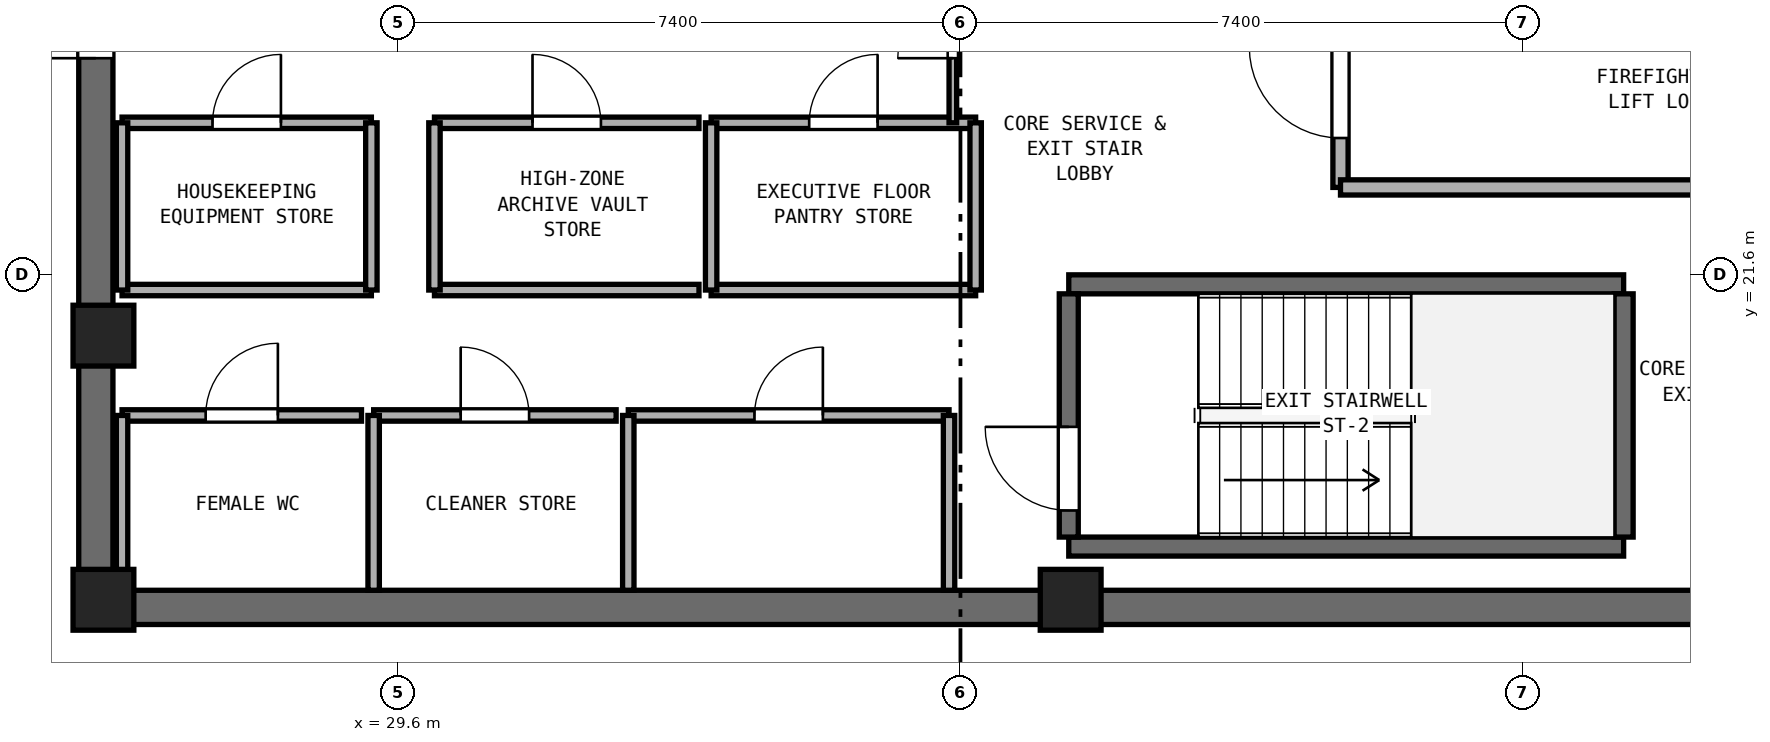
"""IFC4 building model, lengths in metres.
Left out: names, types, materials, properties, quantities, classifications, styles, units other than length and angle.
Written with IfcOpenShell. Run it as: python <this file> out.ifc"""

import sys

from ifc_helpers import new_model, si_unit, direction, frame, frame_2d, origin, origin_2d, place, context, subcontext, project, spatial, rectangle, extrude, element, fill, save


model = new_model("IFC4")
c1 = context("Model", 3, precision=1e-05, world=origin(), true_north=direction((0.0, 1.0)))
c2 = subcontext(c1, "Body", "Model", "MODEL_VIEW")
j1 = project(units=[si_unit("LENGTHUNIT", "METRE"), si_unit("PLANEANGLEUNIT", "RADIAN")], contexts=[c1])
p1 = place(None, origin())
s1 = spatial("IfcSite", under=j1, at=p1, CompositionType="ELEMENT")
p2 = place(p1, origin())
s2 = spatial("IfcBuilding", under=s1, at=p2, CompositionType="ELEMENT")
p3 = place(p2, frame((0.0, 0.0, 293.4)))
s3 = spatial("IfcBuildingStorey", under=s2, at=p3, CompositionType="ELEMENT", Elevation=293.4)
p4 = place(p3, frame((25.4, 17.225, 0.0), z_axis=(0.0, 0.0, 1.0), x_axis=(1.0, 0.0, 0.0)))
e1 = element("IfcWall", 1, at=p4, inside=s3, PredefinedType="SHEAR", context=c2, shape_type="SweptSolid", body=[
    extrude(rectangle(XDim=23.2, YDim=0.45, at=frame_2d((11.6, 0.0))), origin(), (0.0, 0.0, 1.0), 3.54),
])
p5 = place(p3, frame((25.625, 17.45, 0.0), z_axis=(0.0, 0.0, 1.0), x_axis=(0.0, 1.0, 0.0)))
e2 = element("IfcWall", 2, at=p5, inside=s3, PredefinedType="SHEAR", context=c2, shape_type="SweptSolid", body=[
    extrude(rectangle(XDim=15.5, YDim=0.45, at=frame_2d((7.75, 0.0))), origin(), (0.0, 0.0, 1.0), 3.54),
])
p6 = place(p5, frame((7.0, 0.0, 0.0)))
e3 = element("IfcOpeningElement", 3, at=p6, cuts=e2, PredefinedType="OPENING", context=c2, shape_type="SweptSolid", body=[
    extrude(rectangle(XDim=1.5, YDim=2.15, at=frame_2d((0.75, 1.075))), frame((0.0, 0.235, 0.0), z_axis=(0.0, -1.0, 0.0), x_axis=(1.0, 0.0, 0.0)), (0.0, 0.0, 1.0), 0.47),
])
for number, where, z_axis, x_axis in (
    (4, (25.725, 17.325, 0.0), (0.0, 0.0, 1.0), (1.0, 0.0, 0.0)),
    (5, (38.45, 17.325, 0.0), (0.0, 0.0, 1.0), (1.0, 0.0, 0.0)),
    (6, (25.725, 20.8, 0.0), (0.0, 0.0, 1.0), (1.0, 0.0, 0.0)),
):
    element("IfcColumn", number, at=place(p3, frame(where, z_axis=z_axis, x_axis=x_axis)), inside=s3, PredefinedType="PILASTER", context=c2, shape_type="SweptSolid", body=[
        extrude(rectangle(XDim=0.8, YDim=0.8, at=origin_2d()), origin(), (0.0, 0.0, 1.0), 3.8),
    ])
for number, where, z_axis, x_axis in (
    (7, (38.425, 18.025, 0.0), (0.0, 0.0, 1.0), (1.0, 0.0, 0.0)),
    (8, (38.425, 21.475, 0.0), (0.0, 0.0, 1.0), (1.0, 0.0, 0.0)),
):
    element("IfcWall", number, at=place(p3, frame(where, z_axis=z_axis, x_axis=x_axis)), inside=s3, PredefinedType="SHEAR", context=c2, shape_type="SweptSolid", body=[
        extrude(rectangle(XDim=7.3, YDim=0.25, at=frame_2d((3.65, 0.0))), origin(), (0.0, 0.0, 1.0), 3.54),
    ])
p7 = place(p3, frame((38.425, 18.15, 0.0), z_axis=(0.0, 0.0, 1.0), x_axis=(0.0, 1.0, 0.0)))
e9 = element("IfcWall", 9, at=p7, inside=s3, PredefinedType="SHEAR", context=c2, shape_type="SweptSolid", body=[
    extrude(rectangle(XDim=3.2, YDim=0.25, at=frame_2d((1.6, 0.0))), origin(), (0.0, 0.0, 1.0), 3.54),
])
p8 = place(p7, frame((0.35, 0.0, 0.0)))
e10 = element("IfcOpeningElement", 10, at=p8, cuts=e9, PredefinedType="OPENING", context=c2, shape_type="SweptSolid", body=[
    extrude(rectangle(XDim=1.1, YDim=2.15, at=frame_2d((0.55, 1.075))), frame((0.0, 0.135, 0.0), z_axis=(0.0, -1.0, 0.0), x_axis=(1.0, 0.0, 0.0)), (0.0, 0.0, 1.0), 0.27),
])
p9 = place(p3, frame((45.725, 18.15, 0.0), z_axis=(0.0, 0.0, 1.0), x_axis=(0.0, 1.0, 0.0)))
e11 = element("IfcWall", 11, at=p9, inside=s3, PredefinedType="SHEAR", context=c2, shape_type="SweptSolid", body=[
    extrude(rectangle(XDim=3.2, YDim=0.25, at=frame_2d((1.6, 0.0))), origin(), (0.0, 0.0, 1.0), 3.54),
])
p10 = place(p3, frame((42.0, 22.75, 0.0), z_axis=(0.0, 0.0, 1.0), x_axis=(0.0, 1.0, 0.0)))
e12 = element("IfcWall", 12, at=p10, inside=s3, PredefinedType="SOLIDWALL", context=c2, shape_type="SweptSolid", body=[
    extrude(rectangle(XDim=6.05, YDim=0.2, at=frame_2d((3.025, 0.0))), origin(), (0.0, 0.0, 1.0), 3.54),
])
p11 = place(p10, frame((0.65, 0.0, 0.0)))
e13 = element("IfcOpeningElement", 13, at=p11, cuts=e12, PredefinedType="OPENING", context=c2, shape_type="SweptSolid", body=[
    extrude(rectangle(XDim=1.2, YDim=2.15, at=frame_2d((0.6, 1.075))), frame((0.0, 0.11, 0.0), z_axis=(0.0, -1.0, 0.0), x_axis=(1.0, 0.0, 0.0)), (0.0, 0.0, 1.0), 0.22),
])
p12 = place(p3, frame((42.0, 22.75, 0.0), z_axis=(0.0, 0.0, 1.0), x_axis=(1.0, 0.0, 0.0)))
e14 = element("IfcWall", 14, at=p12, inside=s3, PredefinedType="SOLIDWALL", context=c2, shape_type="SweptSolid", body=[
    extrude(rectangle(XDim=6.15, YDim=0.2, at=frame_2d((3.075, 0.0))), origin(), (0.0, 0.0, 1.0), 3.54),
])
p13 = place(p3, frame((25.97, 19.75, 0.0), z_axis=(0.0, 0.0, 1.0), x_axis=(1.0, 0.0, 0.0)))
e15 = element("IfcWall", 15, at=p13, inside=s3, PredefinedType="PARTITIONING", context=c2, shape_type="SweptSolid", body=[
    extrude(rectangle(XDim=3.15, YDim=0.15, at=frame_2d((1.575, 0.0))), origin(), (0.0, 0.0, 1.0), 3.54),
])
p14 = place(p13, frame((1.1, 0.0, 0.0)))
e16 = element("IfcOpeningElement", 16, at=p14, cuts=e15, PredefinedType="OPENING", context=c2, shape_type="SweptSolid", body=[
    extrude(rectangle(XDim=0.95, YDim=2.1, at=frame_2d((0.475, 1.05))), frame((0.0, 0.085, 0.0), z_axis=(0.0, -1.0, 0.0), x_axis=(1.0, 0.0, 0.0)), (0.0, 0.0, 1.0), 0.17),
])
p15 = place(p3, frame((25.97, 17.45, 0.0), z_axis=(0.0, 0.0, 1.0), x_axis=(0.0, 1.0, 0.0)))
e17 = element("IfcWall", 17, at=p15, inside=s3, PredefinedType="PARTITIONING", context=c2, shape_type="SweptSolid", body=[
    extrude(rectangle(XDim=2.3, YDim=0.15, at=frame_2d((1.15, 0.0))), origin(), (0.0, 0.0, 1.0), 2.64),
])
p16 = place(p3, frame((29.28, 19.75, 0.0), z_axis=(0.0, 0.0, 1.0), x_axis=(1.0, 0.0, 0.0)))
e18 = element("IfcWall", 18, at=p16, inside=s3, PredefinedType="PARTITIONING", context=c2, shape_type="SweptSolid", body=[
    extrude(rectangle(XDim=3.19, YDim=0.15, at=frame_2d((1.595, 0.0))), origin(), (0.0, 0.0, 1.0), 3.54),
])
p17 = place(p16, frame((1.145, 0.0, 0.0)))
e19 = element("IfcOpeningElement", 19, at=p17, cuts=e18, PredefinedType="OPENING", context=c2, shape_type="SweptSolid", body=[
    extrude(rectangle(XDim=0.9, YDim=2.1, at=frame_2d((0.45, 1.05))), frame((0.0, 0.085, 0.0), z_axis=(0.0, -1.0, 0.0), x_axis=(1.0, 0.0, 0.0)), (0.0, 0.0, 1.0), 0.17),
])
p18 = place(p3, frame((29.28, 17.45, 0.0), z_axis=(0.0, 0.0, 1.0), x_axis=(0.0, 1.0, 0.0)))
e20 = element("IfcWall", 20, at=p18, inside=s3, PredefinedType="PARTITIONING", context=c2, shape_type="SweptSolid", body=[
    extrude(rectangle(XDim=2.3, YDim=0.15, at=frame_2d((1.15, 0.0))), origin(), (0.0, 0.0, 1.0), 3.54),
])
p19 = place(p3, frame((32.63, 19.75, 0.0), z_axis=(0.0, 0.0, 1.0), x_axis=(1.0, 0.0, 0.0)))
e21 = element("IfcWall", 21, at=p19, inside=s3, PredefinedType="PARTITIONING", context=c2, shape_type="SweptSolid", body=[
    extrude(rectangle(XDim=4.22, YDim=0.15, at=frame_2d((2.11, 0.0))), origin(), (0.0, 0.0, 1.0), 3.54),
])
p20 = place(p19, frame((1.66, 0.0, 0.0)))
e22 = element("IfcOpeningElement", 22, at=p20, cuts=e21, PredefinedType="OPENING", context=c2, shape_type="SweptSolid", body=[
    extrude(rectangle(XDim=0.9, YDim=2.1, at=frame_2d((0.45, 1.05))), frame((0.0, 0.085, 0.0), z_axis=(0.0, -1.0, 0.0), x_axis=(1.0, 0.0, 0.0)), (0.0, 0.0, 1.0), 0.17),
])
for number, where, z_axis, x_axis in (
    (23, (32.63, 17.45, 0.0), (0.0, 0.0, 1.0), (0.0, 1.0, 0.0)),
    (24, (36.85, 17.45, 0.0), (0.0, 0.0, 1.0), (0.0, 1.0, 0.0)),
):
    element("IfcWall", number, at=place(p3, frame(where, z_axis=z_axis, x_axis=x_axis)), inside=s3, PredefinedType="PARTITIONING", context=c2, shape_type="SweptSolid", body=[
        extrude(rectangle(XDim=2.3, YDim=0.15, at=frame_2d((1.15, 0.0))), origin(), (0.0, 0.0, 1.0), 3.54),
    ])
p21 = place(p3, frame((25.97, 21.4, 0.0), z_axis=(0.0, 0.0, 1.0), x_axis=(1.0, 0.0, 0.0)))
e25 = element("IfcWall", 25, at=p21, inside=s3, PredefinedType="PARTITIONING", context=c2, shape_type="SweptSolid", body=[
    extrude(rectangle(XDim=3.28, YDim=0.15, at=frame_2d((1.64, 0.0))), origin(), (0.0, 0.0, 1.0), 3.54),
])
p22 = place(p3, frame((25.97, 23.6, 0.0), z_axis=(0.0, 0.0, 1.0), x_axis=(1.0, 0.0, 0.0)))
e26 = element("IfcWall", 26, at=p22, inside=s3, PredefinedType="PARTITIONING", context=c2, shape_type="SweptSolid", body=[
    extrude(rectangle(XDim=3.28, YDim=0.15, at=frame_2d((1.64, 0.0))), origin(), (0.0, 0.0, 1.0), 3.54),
])
p23 = place(p22, frame((1.19, 0.0, 0.0)))
e27 = element("IfcOpeningElement", 27, at=p23, cuts=e26, PredefinedType="OPENING", context=c2, shape_type="SweptSolid", body=[
    extrude(rectangle(XDim=0.9, YDim=2.1, at=frame_2d((0.45, 1.05))), frame((0.0, 0.085, 0.0), z_axis=(0.0, -1.0, 0.0), x_axis=(1.0, 0.0, 0.0)), (0.0, 0.0, 1.0), 0.17),
])
p24 = place(p3, frame((25.97, 21.4, 0.0), z_axis=(0.0, 0.0, 1.0), x_axis=(0.0, 1.0, 0.0)))
e28 = element("IfcWall", 28, at=p24, inside=s3, PredefinedType="PARTITIONING", context=c2, shape_type="SweptSolid", body=[
    extrude(rectangle(XDim=2.2, YDim=0.15, at=frame_2d((1.1, 0.0))), origin(), (0.0, 0.0, 1.0), 2.64),
])
p25 = place(p3, frame((29.25, 21.4, 0.0), z_axis=(0.0, 0.0, 1.0), x_axis=(0.0, 1.0, 0.0)))
e29 = element("IfcWall", 29, at=p25, inside=s3, PredefinedType="PARTITIONING", context=c2, shape_type="SweptSolid", body=[
    extrude(rectangle(XDim=2.2, YDim=0.15, at=frame_2d((1.1, 0.0))), origin(), (0.0, 0.0, 1.0), 3.54),
])
p26 = place(p3, frame((30.08, 21.4, 0.0), z_axis=(0.0, 0.0, 1.0), x_axis=(1.0, 0.0, 0.0)))
e30 = element("IfcWall", 30, at=p26, inside=s3, PredefinedType="PARTITIONING", context=c2, shape_type="SweptSolid", body=[
    extrude(rectangle(XDim=3.48, YDim=0.15, at=frame_2d((1.74, 0.0))), origin(), (0.0, 0.0, 1.0), 3.54),
])
p27 = place(p3, frame((30.08, 23.6, 0.0), z_axis=(0.0, 0.0, 1.0), x_axis=(1.0, 0.0, 0.0)))
e31 = element("IfcWall", 31, at=p27, inside=s3, PredefinedType="PARTITIONING", context=c2, shape_type="SweptSolid", body=[
    extrude(rectangle(XDim=3.48, YDim=0.15, at=frame_2d((1.74, 0.0))), origin(), (0.0, 0.0, 1.0), 3.54),
])
p28 = place(p27, frame((1.29, 0.0, 0.0)))
e32 = element("IfcOpeningElement", 32, at=p28, cuts=e31, PredefinedType="OPENING", context=c2, shape_type="SweptSolid", body=[
    extrude(rectangle(XDim=0.9, YDim=2.1, at=frame_2d((0.45, 1.05))), frame((0.0, 0.085, 0.0), z_axis=(0.0, -1.0, 0.0), x_axis=(1.0, 0.0, 0.0)), (0.0, 0.0, 1.0), 0.17),
])
p29 = place(p3, frame((30.08, 21.4, 0.0), z_axis=(0.0, 0.0, 1.0), x_axis=(0.0, 1.0, 0.0)))
e33 = element("IfcWall", 33, at=p29, inside=s3, PredefinedType="PARTITIONING", context=c2, shape_type="SweptSolid", body=[
    extrude(rectangle(XDim=2.2, YDim=0.15, at=frame_2d((1.1, 0.0))), origin(), (0.0, 0.0, 1.0), 3.54),
])
p30 = place(p3, frame((33.72, 21.4, 0.0), z_axis=(0.0, 0.0, 1.0), x_axis=(1.0, 0.0, 0.0)))
e34 = element("IfcWall", 34, at=p30, inside=s3, PredefinedType="PARTITIONING", context=c2, shape_type="SweptSolid", body=[
    extrude(rectangle(XDim=3.48, YDim=0.15, at=frame_2d((1.74, 0.0))), origin(), (0.0, 0.0, 1.0), 3.54),
])
p31 = place(p3, frame((33.72, 23.6, 0.0), z_axis=(0.0, 0.0, 1.0), x_axis=(1.0, 0.0, 0.0)))
e35 = element("IfcWall", 35, at=p31, inside=s3, PredefinedType="PARTITIONING", context=c2, shape_type="SweptSolid", body=[
    extrude(rectangle(XDim=3.48, YDim=0.15, at=frame_2d((1.74, 0.0))), origin(), (0.0, 0.0, 1.0), 3.54),
])
p32 = place(p31, frame((1.29, 0.0, 0.0)))
e36 = element("IfcOpeningElement", 36, at=p32, cuts=e35, PredefinedType="OPENING", context=c2, shape_type="SweptSolid", body=[
    extrude(rectangle(XDim=0.9, YDim=2.1, at=frame_2d((0.45, 1.05))), frame((0.0, 0.085, 0.0), z_axis=(0.0, -1.0, 0.0), x_axis=(1.0, 0.0, 0.0)), (0.0, 0.0, 1.0), 0.17),
])
for number, where, z_axis, x_axis in (
    (37, (33.72, 21.4, 0.0), (0.0, 0.0, 1.0), (0.0, 1.0, 0.0)),
    (38, (37.2, 21.4, 0.0), (0.0, 0.0, 1.0), (0.0, 1.0, 0.0)),
):
    element("IfcWall", number, at=place(p3, frame(where, z_axis=z_axis, x_axis=x_axis)), inside=s3, PredefinedType="PARTITIONING", context=c2, shape_type="SweptSolid", body=[
        extrude(rectangle(XDim=2.2, YDim=0.15, at=frame_2d((1.1, 0.0))), origin(), (0.0, 0.0, 1.0), 3.54),
    ])
p33 = place(p3, frame((36.9, 23.6, 0.0), z_axis=(0.0, 0.0, 1.0), x_axis=(0.0, 1.0, 0.0)))
e39 = element("IfcWall", 39, at=p33, inside=s3, PredefinedType="PARTITIONING", context=c2, shape_type="SweptSolid", body=[
    extrude(rectangle(XDim=3.2, YDim=0.1, at=frame_2d((1.6, 0.0))), origin(), (0.0, 0.0, 1.0), 3.54),
])
p34 = place(p33, frame((0.85, 0.0, 0.0)))
e40 = element("IfcOpeningElement", 40, at=p34, cuts=e39, PredefinedType="OPENING", context=c2, shape_type="SweptSolid", body=[
    extrude(rectangle(XDim=1.45, YDim=2.12, at=frame_2d((0.725, 1.06))), frame((0.0, 0.06, 0.0), z_axis=(0.0, -1.0, 0.0), x_axis=(1.0, 0.0, 0.0)), (0.0, 0.0, 1.0), 0.12),
])
p35 = place(p8, origin())
e41 = element("IfcDoor", 41, at=p35, inside=s3, OperationType="SINGLE_SWING_RIGHT", PredefinedType="DOOR", context=c2, shape_type="SweptSolid", body=[
    extrude(rectangle(XDim=1.1, YDim=2.15, at=frame_2d((0.55, 1.075))), frame((0.0, 0.025, 0.0), z_axis=(0.0, -1.0, 0.0), x_axis=(1.0, 0.0, 0.0)), (0.0, 0.0, 1.0), 0.05),
])
fill(e10, e41)
p36 = place(p11, origin())
e42 = element("IfcDoor", 42, at=p36, inside=s3, OperationType="SINGLE_SWING_RIGHT", PredefinedType="DOOR", context=c2, shape_type="SweptSolid", body=[
    extrude(rectangle(XDim=1.2, YDim=2.15, at=frame_2d((0.6, 1.075))), frame((0.0, 0.025, 0.0), z_axis=(0.0, -1.0, 0.0), x_axis=(1.0, 0.0, 0.0)), (0.0, 0.0, 1.0), 0.05),
])
fill(e13, e42)
p37 = place(p6, origin())
e43 = element("IfcDoor", 43, at=p37, inside=s3, OperationType="DOUBLE_DOOR_SINGLE_SWING", PredefinedType="DOOR", context=c2, shape_type="SweptSolid", body=[
    extrude(rectangle(XDim=1.5, YDim=2.15, at=frame_2d((0.75, 1.075))), frame((0.0, 0.025, 0.0), z_axis=(0.0, -1.0, 0.0), x_axis=(1.0, 0.0, 0.0)), (0.0, 0.0, 1.0), 0.05),
])
fill(e3, e43)
p38 = place(p14, origin())
e44 = element("IfcDoor", 44, at=p38, inside=s3, OperationType="SINGLE_SWING_RIGHT", PredefinedType="DOOR", context=c2, shape_type="SweptSolid", body=[
    extrude(rectangle(XDim=0.95, YDim=2.1, at=frame_2d((0.475, 1.05))), frame((0.0, 0.025, 0.0), z_axis=(0.0, -1.0, 0.0), x_axis=(1.0, 0.0, 0.0)), (0.0, 0.0, 1.0), 0.05),
])
fill(e16, e44)
p39 = place(p17, origin())
e45 = element("IfcDoor", 45, at=p39, inside=s3, OperationType="SINGLE_SWING_LEFT", PredefinedType="DOOR", context=c2, shape_type="SweptSolid", body=[
    extrude(rectangle(XDim=0.9, YDim=2.1, at=frame_2d((0.45, 1.05))), frame((0.0, 0.025, 0.0), z_axis=(0.0, -1.0, 0.0), x_axis=(1.0, 0.0, 0.0)), (0.0, 0.0, 1.0), 0.05),
])
fill(e19, e45)
p40 = place(p20, origin())
e46 = element("IfcDoor", 46, at=p40, inside=s3, OperationType="SINGLE_SWING_RIGHT", PredefinedType="DOOR", context=c2, shape_type="SweptSolid", body=[
    extrude(rectangle(XDim=0.9, YDim=2.1, at=frame_2d((0.45, 1.05))), frame((0.0, 0.025, 0.0), z_axis=(0.0, -1.0, 0.0), x_axis=(1.0, 0.0, 0.0)), (0.0, 0.0, 1.0), 0.05),
])
fill(e22, e46)
p41 = place(p23, origin())
e47 = element("IfcDoor", 47, at=p41, inside=s3, OperationType="SINGLE_SWING_RIGHT", PredefinedType="DOOR", context=c2, shape_type="SweptSolid", body=[
    extrude(rectangle(XDim=0.9, YDim=2.1, at=frame_2d((0.45, 1.05))), frame((0.0, 0.025, 0.0), z_axis=(0.0, -1.0, 0.0), x_axis=(1.0, 0.0, 0.0)), (0.0, 0.0, 1.0), 0.05),
])
fill(e27, e47)
p42 = place(p28, origin())
e48 = element("IfcDoor", 48, at=p42, inside=s3, OperationType="SINGLE_SWING_LEFT", PredefinedType="DOOR", context=c2, shape_type="SweptSolid", body=[
    extrude(rectangle(XDim=0.9, YDim=2.1, at=frame_2d((0.45, 1.05))), frame((0.0, 0.025, 0.0), z_axis=(0.0, -1.0, 0.0), x_axis=(1.0, 0.0, 0.0)), (0.0, 0.0, 1.0), 0.05),
])
fill(e32, e48)
p43 = place(p32, origin())
e49 = element("IfcDoor", 49, at=p43, inside=s3, OperationType="SINGLE_SWING_RIGHT", PredefinedType="DOOR", context=c2, shape_type="SweptSolid", body=[
    extrude(rectangle(XDim=0.9, YDim=2.1, at=frame_2d((0.45, 1.05))), frame((0.0, 0.025, 0.0), z_axis=(0.0, -1.0, 0.0), x_axis=(1.0, 0.0, 0.0)), (0.0, 0.0, 1.0), 0.05),
])
fill(e36, e49)
p44 = place(p34, origin())
e50 = element("IfcDoor", 50, at=p44, inside=s3, OperationType="DOUBLE_DOOR_SINGLE_SWING", PredefinedType="DOOR", context=c2, shape_type="SweptSolid", body=[
    extrude(rectangle(XDim=1.45, YDim=2.12, at=frame_2d((0.725, 1.06))), frame((0.0, 0.025, 0.0), z_axis=(0.0, -1.0, 0.0), x_axis=(1.0, 0.0, 0.0)), (0.0, 0.0, 1.0), 0.05),
])
fill(e40, e50)
save(model, sys.argv[1])
